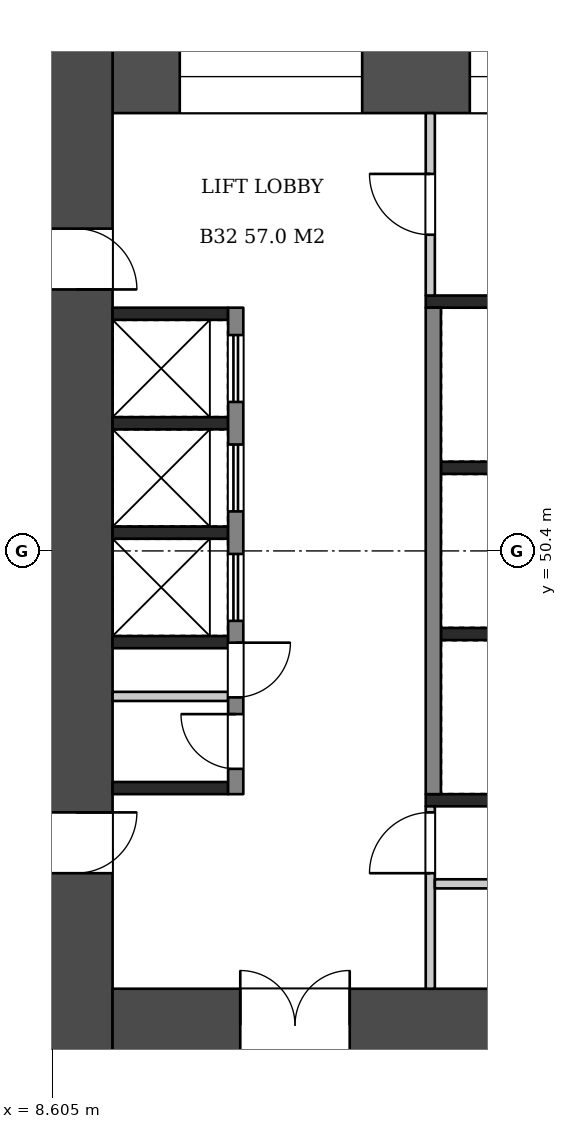
"""IFC4 building model, lengths in metres.
Left out: names, types, materials, properties, quantities, classifications, styles, units other than length and angle.
Written with IfcOpenShell. Run it as: python <this file> out.ifc"""

import sys

from ifc_helpers import new_model, si_unit, direction, frame, frame_2d, origin, place, context, subcontext, project, spatial, rectangle, extrude, element, fill, save


model = new_model("IFC4")
c1 = context("Model", 3, precision=1e-05, world=origin(), true_north=direction((0.0, 1.0)))
c2 = subcontext(c1, "Body", "Model", "MODEL_VIEW")
j1 = project(units=[si_unit("LENGTHUNIT", "METRE"), si_unit("PLANEANGLEUNIT", "RADIAN")], contexts=[c1])
p1 = place(None, origin())
s1 = spatial("IfcSite", under=j1, at=p1, CompositionType="ELEMENT")
p2 = place(p1, origin())
s2 = spatial("IfcBuilding", under=s1, at=p2, CompositionType="ELEMENT")
p3 = place(p2, frame((0.0, 0.0, 126.7)))
s3 = spatial("IfcBuildingStorey", under=s2, at=p3, CompositionType="ELEMENT", Elevation=126.7)
p4 = place(p3, frame((9.0, 58.8, 0.0), z_axis=(0.0, 0.0, 1.0), x_axis=(0.0, -1.0, 0.0)))
e1 = element("IfcWall", 1, at=p4, inside=s3, PredefinedType="SHEAR", context=c2, shape_type="SweptSolid", body=[
    extrude(rectangle(XDim=16.8, YDim=1.2, at=frame_2d((8.4, 0.0))), origin(), (0.0, 0.0, 1.0), 3.22),
])
p5 = place(p4, frame((3.1, 0.0, 0.0)))
e2 = element("IfcOpeningElement", 2, at=p5, cuts=e1, PredefinedType="OPENING", context=c2, shape_type="SweptSolid", body=[
    extrude(rectangle(XDim=1.0, YDim=2.1, at=frame_2d((0.5, 1.05))), frame((0.0, 0.61, 0.0), z_axis=(0.0, -1.0, 0.0), x_axis=(1.0, 0.0, 0.0)), (0.0, 0.0, 1.0), 1.22),
])
p6 = place(p4, frame((12.7, 0.0, 0.0)))
e3 = element("IfcOpeningElement", 3, at=p6, cuts=e1, PredefinedType="OPENING", context=c2, shape_type="SweptSolid", body=[
    extrude(rectangle(XDim=1.0, YDim=2.1, at=frame_2d((0.5, 1.05))), frame((0.0, 0.61, 0.0), z_axis=(0.0, -1.0, 0.0), x_axis=(1.0, 0.0, 0.0)), (0.0, 0.0, 1.0), 1.22),
])
p7 = place(p3, frame((9.6, 58.2, 0.0), z_axis=(0.0, 0.0, 1.0), x_axis=(1.0, 0.0, 0.0)))
e4 = element("IfcWall", 4, at=p7, inside=s3, PredefinedType="SHEAR", context=c2, shape_type="SweptSolid", body=[
    extrude(rectangle(XDim=14.4, YDim=1.2, at=frame_2d((7.2, 0.0))), origin(), (0.0, 0.0, 1.0), 3.22),
])
p8 = place(p7, frame((1.105, 0.0, 0.6)))
e5 = element("IfcOpeningElement", 5, at=p8, cuts=e4, PredefinedType="OPENING", context=c2, shape_type="SweptSolid", body=[
    extrude(rectangle(XDim=3.0, YDim=2.1, at=frame_2d((1.5, 1.05))), frame((0.0, 0.61, 0.0), z_axis=(0.0, -1.0, 0.0), x_axis=(1.0, 0.0, 0.0)), (0.0, 0.0, 1.0), 1.22),
])
p9 = place(p7, frame((5.875, 0.0, 0.6)))
e6 = element("IfcOpeningElement", 6, at=p9, cuts=e4, PredefinedType="OPENING", context=c2, shape_type="SweptSolid", body=[
    extrude(rectangle(XDim=2.4, YDim=2.1, at=frame_2d((1.2, 1.05))), frame((0.0, 0.61, 0.0), z_axis=(0.0, -1.0, 0.0), x_axis=(1.0, 0.0, 0.0)), (0.0, 0.0, 1.0), 1.22),
])
p10 = place(p7, frame((9.993, 0.0, 0.5)))
e7 = element("IfcOpeningElement", 7, at=p10, cuts=e4, PredefinedType="OPENING", context=c2, shape_type="SweptSolid", body=[
    extrude(rectangle(XDim=1.2, YDim=2.4, at=frame_2d((0.6, 1.2))), frame((0.0, 0.61, 0.0), z_axis=(0.0, -1.0, 0.0), x_axis=(1.0, 0.0, 0.0)), (0.0, 0.0, 1.0), 1.22),
])
p11 = place(p7, frame((12.197, 0.0, 0.5)))
e8 = element("IfcOpeningElement", 8, at=p11, cuts=e4, PredefinedType="OPENING", context=c2, shape_type="SweptSolid", body=[
    extrude(rectangle(XDim=1.2, YDim=2.4, at=frame_2d((0.6, 1.2))), frame((0.0, 0.61, 0.0), z_axis=(0.0, -1.0, 0.0), x_axis=(1.0, 0.0, 0.0)), (0.0, 0.0, 1.0), 1.22),
])
p12 = place(p3, frame((9.6, 42.6, 0.0), z_axis=(0.0, 0.0, 1.0), x_axis=(1.0, 0.0, 0.0)))
e9 = element("IfcWall", 9, at=p12, inside=s3, PredefinedType="SHEAR", context=c2, shape_type="SweptSolid", body=[
    extrude(rectangle(XDim=14.4, YDim=1.2, at=frame_2d((7.2, 0.0))), origin(), (0.0, 0.0, 1.0), 3.22),
])
p13 = place(p12, frame((2.1, 0.0, 0.0)))
e10 = element("IfcOpeningElement", 10, at=p13, cuts=e9, PredefinedType="OPENING", context=c2, shape_type="SweptSolid", body=[
    extrude(rectangle(XDim=1.8, YDim=2.1, at=frame_2d((0.9, 1.05))), frame((0.0, 0.61, 0.0), z_axis=(0.0, -1.0, 0.0), x_axis=(1.0, 0.0, 0.0)), (0.0, 0.0, 1.0), 1.22),
])
for number, where, z_axis, x_axis in (
    (11, (9.6, 54.3, 0.0), (0.0, 0.0, 1.0), (1.0, 0.0, 0.0)),
    (12, (9.6, 52.5, 0.0), (0.0, 0.0, 1.0), (1.0, 0.0, 0.0)),
    (13, (9.6, 50.7, 0.0), (0.0, 0.0, 1.0), (1.0, 0.0, 0.0)),
    (14, (9.6, 48.9, 0.0), (0.0, 0.0, 1.0), (1.0, 0.0, 0.0)),
    (15, (9.6, 46.5, 0.0), (0.0, 0.0, 1.0), (1.0, 0.0, 0.0)),
):
    element("IfcWall", number, at=place(p3, frame(where, z_axis=z_axis, x_axis=x_axis)), inside=s3, PredefinedType="SHEAR", context=c2, shape_type="SweptSolid", body=[
        extrude(rectangle(XDim=1.9, YDim=0.2, at=frame_2d((0.95, 0.0))), origin(), (0.0, 0.0, 1.0), 3.22),
    ])
p14 = place(p3, frame((9.6, 48.008, 0.0), z_axis=(0.0, 0.0, 1.0), x_axis=(1.0, 0.0, 0.0)))
e16 = element("IfcWall", 16, at=p14, inside=s3, PredefinedType="PARTITIONING", context=c2, shape_type="SweptSolid", body=[
    extrude(rectangle(XDim=1.9, YDim=0.15, at=frame_2d((0.95, 0.0))), origin(), (0.0, 0.0, 1.0), 3.22),
])
p15 = place(p3, frame((11.625, 54.4, 0.0), z_axis=(0.0, 0.0, 1.0), x_axis=(0.0, -1.0, 0.0)))
e17 = element("IfcWall", 17, at=p15, inside=s3, PredefinedType="SHEAR", context=c2, shape_type="SweptSolid", body=[
    extrude(rectangle(XDim=8.0, YDim=0.25, at=frame_2d((4.0, 0.0))), origin(), (0.0, 0.0, 1.0), 3.22),
])
p16 = place(p15, frame((0.45, 0.0, 0.0)))
e18 = element("IfcOpeningElement", 18, at=p16, cuts=e17, PredefinedType="OPENING", context=c2, shape_type="SweptSolid", body=[
    extrude(rectangle(XDim=1.1, YDim=2.1, at=frame_2d((0.55, 1.05))), frame((0.0, 0.135, 0.0), z_axis=(0.0, -1.0, 0.0), x_axis=(1.0, 0.0, 0.0)), (0.0, 0.0, 1.0), 0.27),
])
p17 = place(p15, frame((2.25, 0.0, 0.0)))
e19 = element("IfcOpeningElement", 19, at=p17, cuts=e17, PredefinedType="OPENING", context=c2, shape_type="SweptSolid", body=[
    extrude(rectangle(XDim=1.1, YDim=2.1, at=frame_2d((0.55, 1.05))), frame((0.0, 0.135, 0.0), z_axis=(0.0, -1.0, 0.0), x_axis=(1.0, 0.0, 0.0)), (0.0, 0.0, 1.0), 0.27),
])
p18 = place(p15, frame((4.05, 0.0, 0.0)))
e20 = element("IfcOpeningElement", 20, at=p18, cuts=e17, PredefinedType="OPENING", context=c2, shape_type="SweptSolid", body=[
    extrude(rectangle(XDim=1.1, YDim=2.1, at=frame_2d((0.55, 1.05))), frame((0.0, 0.135, 0.0), z_axis=(0.0, -1.0, 0.0), x_axis=(1.0, 0.0, 0.0)), (0.0, 0.0, 1.0), 0.27),
])
p19 = place(p15, frame((5.509, 0.0, 0.0)))
e21 = element("IfcOpeningElement", 21, at=p19, cuts=e17, PredefinedType="OPENING", context=c2, shape_type="SweptSolid", body=[
    extrude(rectangle(XDim=0.9, YDim=2.1, at=frame_2d((0.45, 1.05))), frame((0.0, 0.135, 0.0), z_axis=(0.0, -1.0, 0.0), x_axis=(1.0, 0.0, 0.0)), (0.0, 0.0, 1.0), 0.27),
])
p20 = place(p15, frame((6.684, 0.0, 0.0)))
e22 = element("IfcOpeningElement", 22, at=p20, cuts=e17, PredefinedType="OPENING", context=c2, shape_type="SweptSolid", body=[
    extrude(rectangle(XDim=0.9, YDim=2.1, at=frame_2d((0.45, 1.05))), frame((0.0, 0.135, 0.0), z_axis=(0.0, -1.0, 0.0), x_axis=(1.0, 0.0, 0.0)), (0.0, 0.0, 1.0), 0.27),
])
for number, where, z_axis, x_axis in (
    (23, (15.0, 51.767, 0.0), (0.0, 0.0, 1.0), (1.0, 0.0, 0.0)),
    (24, (15.0, 49.033, 0.0), (0.0, 0.0, 1.0), (1.0, 0.0, 0.0)),
):
    element("IfcWall", number, at=place(p3, frame(where, z_axis=z_axis, x_axis=x_axis)), inside=s3, PredefinedType="SHEAR", context=c2, shape_type="SweptSolid", body=[
        extrude(rectangle(XDim=1.9, YDim=0.2, at=frame_2d((0.95, 0.0))), origin(), (0.0, 0.0, 1.0), 3.22),
    ])
p21 = place(p3, frame((14.875, 54.4, 0.0), z_axis=(0.0, 0.0, 1.0), x_axis=(0.0, -1.0, 0.0)))
e25 = element("IfcWall", 25, at=p21, inside=s3, PredefinedType="SHEAR", context=c2, shape_type="SweptSolid", body=[
    extrude(rectangle(XDim=8.0, YDim=0.25, at=frame_2d((4.0, 0.0))), origin(), (0.0, 0.0, 1.0), 3.22),
])
p22 = place(p3, frame((14.75, 54.5, 0.0), z_axis=(0.0, 0.0, 1.0), x_axis=(1.0, 0.0, 0.0)))
e26 = element("IfcWall", 26, at=p22, inside=s3, PredefinedType="SHEAR", context=c2, shape_type="SweptSolid", body=[
    extrude(rectangle(XDim=2.4, YDim=0.2, at=frame_2d((1.2, 0.0))), origin(), (0.0, 0.0, 1.0), 3.22),
])
p23 = place(p3, frame((14.825, 57.6, 0.0), z_axis=(0.0, 0.0, 1.0), x_axis=(0.0, -1.0, 0.0)))
e27 = element("IfcWall", 27, at=p23, inside=s3, PredefinedType="PARTITIONING", context=c2, shape_type="SweptSolid", body=[
    extrude(rectangle(XDim=3.0, YDim=0.15, at=frame_2d((1.5, 0.0))), origin(), (0.0, 0.0, 1.0), 3.22),
])
p24 = place(p23, frame((1.0, 0.0, 0.0)))
e28 = element("IfcOpeningElement", 28, at=p24, cuts=e27, PredefinedType="OPENING", context=c2, shape_type="SweptSolid", body=[
    extrude(rectangle(XDim=1.0, YDim=2.1, at=frame_2d((0.5, 1.05))), frame((0.0, 0.085, 0.0), z_axis=(0.0, -1.0, 0.0), x_axis=(1.0, 0.0, 0.0)), (0.0, 0.0, 1.0), 0.17),
])
p25 = place(p3, frame((14.75, 46.3, 0.0), z_axis=(0.0, 0.0, 1.0), x_axis=(1.0, 0.0, 0.0)))
e29 = element("IfcWall", 29, at=p25, inside=s3, PredefinedType="SHEAR", context=c2, shape_type="SweptSolid", body=[
    extrude(rectangle(XDim=9.25, YDim=0.2, at=frame_2d((4.625, 0.0))), origin(), (0.0, 0.0, 1.0), 3.22),
])
p26 = place(p3, frame((14.825, 46.2, 0.0), z_axis=(0.0, 0.0, 1.0), x_axis=(0.0, -1.0, 0.0)))
e30 = element("IfcWall", 30, at=p26, inside=s3, PredefinedType="PARTITIONING", context=c2, shape_type="SweptSolid", body=[
    extrude(rectangle(XDim=3.0, YDim=0.15, at=frame_2d((1.5, 0.0))), origin(), (0.0, 0.0, 1.0), 3.22),
])
p27 = place(p26, frame((0.1, 0.0, 0.0)))
e31 = element("IfcOpeningElement", 31, at=p27, cuts=e30, PredefinedType="OPENING", context=c2, shape_type="SweptSolid", body=[
    extrude(rectangle(XDim=1.0, YDim=2.1, at=frame_2d((0.5, 1.05))), frame((0.0, 0.085, 0.0), z_axis=(0.0, -1.0, 0.0), x_axis=(1.0, 0.0, 0.0)), (0.0, 0.0, 1.0), 0.17),
])
p28 = place(p3, frame((14.9, 44.925, 0.0), z_axis=(0.0, 0.0, 1.0), x_axis=(1.0, 0.0, 0.0)))
e32 = element("IfcWall", 32, at=p28, inside=s3, PredefinedType="PARTITIONING", context=c2, shape_type="SweptSolid", body=[
    extrude(rectangle(XDim=9.1, YDim=0.15, at=frame_2d((4.55, 0.0))), origin(), (0.0, 0.0, 1.0), 3.22),
])
p29 = place(p28, frame((0.893, 0.0, 0.0)))
e33 = element("IfcOpeningElement", 33, at=p29, cuts=e32, PredefinedType="OPENING", context=c2, shape_type="SweptSolid", body=[
    extrude(rectangle(XDim=0.9, YDim=2.1, at=frame_2d((0.45, 1.05))), frame((0.0, 0.085, 0.0), z_axis=(0.0, -1.0, 0.0), x_axis=(1.0, 0.0, 0.0)), (0.0, 0.0, 1.0), 0.17),
])
p30 = place(p28, frame((5.518, 0.0, 0.0)))
e34 = element("IfcOpeningElement", 34, at=p30, cuts=e32, PredefinedType="OPENING", context=c2, shape_type="SweptSolid", body=[
    extrude(rectangle(XDim=0.9, YDim=2.1, at=frame_2d((0.45, 1.05))), frame((0.0, 0.085, 0.0), z_axis=(0.0, -1.0, 0.0), x_axis=(1.0, 0.0, 0.0)), (0.0, 0.0, 1.0), 0.17),
])
p31 = place(p5, origin())
e35 = element("IfcDoor", 35, at=p31, inside=s3, OperationType="SINGLE_SWING_RIGHT", PredefinedType="DOOR", context=c2, shape_type="SweptSolid", body=[
    extrude(rectangle(XDim=1.0, YDim=2.1, at=frame_2d((0.5, 1.05))), frame((0.0, 0.025, 0.0), z_axis=(0.0, -1.0, 0.0), x_axis=(1.0, 0.0, 0.0)), (0.0, 0.0, 1.0), 0.05),
])
fill(e2, e35)
p32 = place(p6, origin())
e36 = element("IfcDoor", 36, at=p32, inside=s3, OperationType="SINGLE_SWING_LEFT", PredefinedType="DOOR", context=c2, shape_type="SweptSolid", body=[
    extrude(rectangle(XDim=1.0, YDim=2.1, at=frame_2d((0.5, 1.05))), frame((0.0, 0.025, 0.0), z_axis=(0.0, -1.0, 0.0), x_axis=(1.0, 0.0, 0.0)), (0.0, 0.0, 1.0), 0.05),
])
fill(e3, e36)
p33 = place(p13, origin())
e37 = element("IfcDoor", 37, at=p33, inside=s3, OperationType="DOUBLE_DOOR_SINGLE_SWING", PredefinedType="DOOR", context=c2, shape_type="SweptSolid", body=[
    extrude(rectangle(XDim=1.8, YDim=2.1, at=frame_2d((0.9, 1.05))), frame((0.0, 0.025, 0.0), z_axis=(0.0, -1.0, 0.0), x_axis=(1.0, 0.0, 0.0)), (0.0, 0.0, 1.0), 0.05),
])
fill(e10, e37)
p34 = place(p16, origin())
e38 = element("IfcDoor", 38, at=p34, inside=s3, OperationType="DOUBLE_DOOR_SLIDING", PredefinedType="DOOR", context=c2, shape_type="SweptSolid", body=[
    extrude(rectangle(XDim=1.1, YDim=2.1, at=frame_2d((0.55, 1.05))), frame((0.0, 0.025, 0.0), z_axis=(0.0, -1.0, 0.0), x_axis=(1.0, 0.0, 0.0)), (0.0, 0.0, 1.0), 0.05),
])
fill(e18, e38)
p35 = place(p17, origin())
e39 = element("IfcDoor", 39, at=p35, inside=s3, OperationType="DOUBLE_DOOR_SLIDING", PredefinedType="DOOR", context=c2, shape_type="SweptSolid", body=[
    extrude(rectangle(XDim=1.1, YDim=2.1, at=frame_2d((0.55, 1.05))), frame((0.0, 0.025, 0.0), z_axis=(0.0, -1.0, 0.0), x_axis=(1.0, 0.0, 0.0)), (0.0, 0.0, 1.0), 0.05),
])
fill(e19, e39)
p36 = place(p18, origin())
e40 = element("IfcDoor", 40, at=p36, inside=s3, OperationType="DOUBLE_DOOR_SLIDING", PredefinedType="DOOR", context=c2, shape_type="SweptSolid", body=[
    extrude(rectangle(XDim=1.1, YDim=2.1, at=frame_2d((0.55, 1.05))), frame((0.0, 0.025, 0.0), z_axis=(0.0, -1.0, 0.0), x_axis=(1.0, 0.0, 0.0)), (0.0, 0.0, 1.0), 0.05),
])
fill(e20, e40)
p37 = place(p19, origin())
e41 = element("IfcDoor", 41, at=p37, inside=s3, OperationType="SINGLE_SWING_LEFT", PredefinedType="DOOR", context=c2, shape_type="SweptSolid", body=[
    extrude(rectangle(XDim=0.9, YDim=2.1, at=frame_2d((0.45, 1.05))), frame((0.0, 0.025, 0.0), z_axis=(0.0, -1.0, 0.0), x_axis=(1.0, 0.0, 0.0)), (0.0, 0.0, 1.0), 0.05),
])
fill(e21, e41)
p38 = place(p20, frame((0.9, 0.0, 0.0), z_axis=(0.0, 0.0, 1.0), x_axis=(-1.0, 0.0, 0.0)))
e42 = element("IfcDoor", 42, at=p38, inside=s3, OperationType="SINGLE_SWING_RIGHT", PredefinedType="DOOR", context=c2, shape_type="SweptSolid", body=[
    extrude(rectangle(XDim=0.9, YDim=2.1, at=frame_2d((0.45, 1.05))), frame((0.0, 0.025, 0.0), z_axis=(0.0, -1.0, 0.0), x_axis=(1.0, 0.0, 0.0)), (0.0, 0.0, 1.0), 0.05),
])
fill(e22, e42)
p39 = place(p24, frame((1.0, 0.0, 0.0), z_axis=(0.0, 0.0, 1.0), x_axis=(-1.0, 0.0, 0.0)))
e43 = element("IfcDoor", 43, at=p39, inside=s3, OperationType="SINGLE_SWING_RIGHT", PredefinedType="DOOR", context=c2, shape_type="SweptSolid", body=[
    extrude(rectangle(XDim=1.0, YDim=2.1, at=frame_2d((0.5, 1.05))), frame((0.0, 0.025, 0.0), z_axis=(0.0, -1.0, 0.0), x_axis=(1.0, 0.0, 0.0)), (0.0, 0.0, 1.0), 0.05),
])
fill(e28, e43)
p40 = place(p27, frame((1.0, 0.0, 0.0), z_axis=(0.0, 0.0, 1.0), x_axis=(-1.0, 0.0, 0.0)))
e44 = element("IfcDoor", 44, at=p40, inside=s3, OperationType="SINGLE_SWING_LEFT", PredefinedType="DOOR", context=c2, shape_type="SweptSolid", body=[
    extrude(rectangle(XDim=1.0, YDim=2.1, at=frame_2d((0.5, 1.05))), frame((0.0, 0.025, 0.0), z_axis=(0.0, -1.0, 0.0), x_axis=(1.0, 0.0, 0.0)), (0.0, 0.0, 1.0), 0.05),
])
fill(e31, e44)
p41 = place(p8, origin())
e45 = element("IfcWindow", 45, at=p41, inside=s3, PartitioningType="SINGLE_PANEL", PredefinedType="WINDOW", context=c2, shape_type="SweptSolid", body=[
    extrude(rectangle(XDim=3.0, YDim=2.1, at=frame_2d((1.5, 1.05))), frame((0.0, 0.03, 0.0), z_axis=(0.0, -1.0, 0.0), x_axis=(1.0, 0.0, 0.0)), (0.0, 0.0, 1.0), 0.06),
])
fill(e5, e45)
p42 = place(p9, origin())
e46 = element("IfcWindow", 46, at=p42, inside=s3, PartitioningType="SINGLE_PANEL", PredefinedType="WINDOW", context=c2, shape_type="SweptSolid", body=[
    extrude(rectangle(XDim=2.4, YDim=2.1, at=frame_2d((1.2, 1.05))), frame((0.0, 0.03, 0.0), z_axis=(0.0, -1.0, 0.0), x_axis=(1.0, 0.0, 0.0)), (0.0, 0.0, 1.0), 0.06),
])
fill(e6, e46)
save(model, sys.argv[1])
